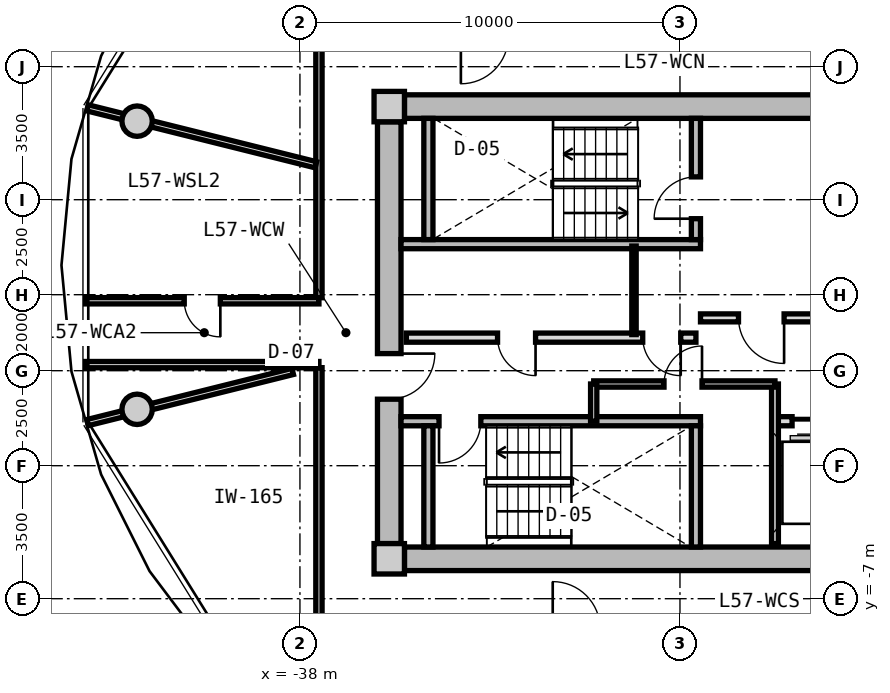
"""IFC4 building model, lengths in metres.
Left out: names, types, materials, properties, quantities, classifications, styles, units other than length and angle.
Written with IfcOpenShell. Run it as: python <this file> out.ifc"""

import sys

from ifc_helpers import new_model, si_unit, direction, frame, frame_2d, origin, origin_2d, place, context, subcontext, project, spatial, rectangle, circle, extrude, source, transform, mapped, element, fill, save


model = new_model("IFC4")
c1 = context("Model", 3, precision=1e-05, world=origin(), true_north=direction((0.0, 1.0)))
c2 = subcontext(c1, "Body", "Model", "MODEL_VIEW")
j1 = project(units=[si_unit("LENGTHUNIT", "METRE"), si_unit("PLANEANGLEUNIT", "RADIAN")], contexts=[c1])
p1 = place(None, origin())
s1 = spatial("IfcSite", under=j1, at=p1, CompositionType="ELEMENT")
p2 = place(p1, origin())
s2 = spatial("IfcBuilding", under=s1, at=p2, CompositionType="ELEMENT")
p3 = place(p2, frame((0.0, 0.0, 183.1)))
s3 = spatial("IfcBuildingStorey", under=s2, at=p3, CompositionType="ELEMENT", Elevation=183.1)
m1 = source(origin(), c2, "Body", "SweptSolid", [
    extrude(rectangle(XDim=0.8, YDim=0.8, at=origin_2d()), origin(), (0.0, 0.0, 1.0), 3.05),
])
for number, where, z_axis, x_axis in (
    (1, (-35.65, -5.95, 0.0), (0.0, 0.0, 1.0), (1.0, 0.0, 0.0)),
    (2, (-35.65, 5.95, 0.0), (0.0, 0.0, 1.0), (1.0, 0.0, 0.0)),
):
    element("IfcColumn", number, at=place(p3, frame(where, z_axis=z_axis, x_axis=x_axis)), inside=s3, PredefinedType="COLUMN", context=c2, shape_type="MappedRepresentation", body=[
        mapped(m1, transform((0.0, 0.0, 0.0), x_axis=(1.0, 0.0, 0.0), y_axis=(0.0, 1.0, 0.0), z_axis=(0.0, 0.0, 1.0), scale=1.0)),
    ])
m2 = source(origin(), c2, "Body", "SweptSolid", [
    extrude(rectangle(XDim=14.5, YDim=0.62, at=frame_2d((7.25, 0.0))), origin(), (0.0, 0.0, 1.0), 2.73),
])
for number, where, z_axis, x_axis in (
    (3, (-35.25, 5.95, 0.0), (0.0, 0.0, 1.0), (1.0, 0.0, 0.0)),
    (4, (-20.75, -5.95, 0.0), (0.0, 0.0, 1.0), (-1.0, 0.0, 0.0)),
):
    element("IfcWall", number, at=place(p3, frame(where, z_axis=z_axis, x_axis=x_axis)), inside=s3, PredefinedType="SHEAR", context=c2, shape_type="MappedRepresentation", body=[
        mapped(m2, transform((0.0, 0.0, 0.0), x_axis=(1.0, 0.0, 0.0), y_axis=(0.0, 1.0, 0.0), z_axis=(0.0, 0.0, 1.0), scale=1.0)),
    ])
m3 = source(origin(), c2, "Body", "SweptSolid", [
    extrude(rectangle(XDim=11.1, YDim=0.62, at=frame_2d((5.55, 0.0))), origin(), (0.0, 0.0, 1.0), 2.73),
])
p4 = place(p3, frame((-35.65, -5.55, 0.0), z_axis=(0.0, 0.0, 1.0), x_axis=(0.0, 1.0, 0.0)))
e5 = element("IfcWall", 5, at=p4, inside=s3, PredefinedType="SHEAR", context=c2, shape_type="MappedRepresentation", body=[
    mapped(m3, transform((0.0, 0.0, 0.0), x_axis=(1.0, 0.0, 0.0), y_axis=(0.0, 1.0, 0.0), z_axis=(0.0, 0.0, 1.0), scale=1.0)),
])
p5 = place(p4, frame((3.8, 0.0, 0.0)))
e6 = element("IfcOpeningElement", 6, at=p5, cuts=e5, PredefinedType="OPENING", context=c2, shape_type="SweptSolid", body=[
    extrude(rectangle(XDim=1.2, YDim=2.15, at=frame_2d((0.6, 1.075))), frame((0.0, 0.32, 0.0), z_axis=(0.0, -1.0, 0.0), x_axis=(1.0, 0.0, 0.0)), (0.0, 0.0, 1.0), 0.64),
])
m4 = source(origin(), c2, "Body", "SweptSolid", [
    extrude(circle(Radius=0.4, at=origin_2d()), origin(), (0.0, 0.0, 1.0), 3.05),
])
for number, where, z_axis, x_axis in (
    (7, (-42.285, 5.567, 0.0), (0.0, 0.0, 1.0), (1.0, 0.0, 0.0)),
    (8, (-42.285, -2.016, 0.0), (0.0, 0.0, 1.0), (1.0, 0.0, 0.0)),
):
    element("IfcColumn", number, at=place(p3, frame(where, z_axis=z_axis, x_axis=x_axis)), inside=s3, PredefinedType="COLUMN", context=c2, shape_type="MappedRepresentation", body=[
        mapped(m4, transform((0.0, 0.0, 0.0), x_axis=(1.0, 0.0, 0.0), y_axis=(0.0, 1.0, 0.0), z_axis=(0.0, 0.0, 1.0), scale=1.0)),
    ])
m5 = source(origin(), c2, "Body", "SweptSolid", [
    extrude(rectangle(XDim=7.88, YDim=0.24, at=frame_2d((3.94, 0.0))), origin(), (0.0, 0.0, 1.0), 2.73),
])
p6 = place(p3, frame((-35.34, 2.33, 0.0), z_axis=(0.0, 0.0, 1.0), x_axis=(1.0, 0.0, 0.0)))
e9 = element("IfcWall", 9, at=p6, inside=s3, PredefinedType="PARTITIONING", context=c2, shape_type="MappedRepresentation", body=[
    mapped(m5, transform((0.0, 0.0, 0.0), x_axis=(1.0, 0.0, 0.0), y_axis=(0.0, 1.0, 0.0), z_axis=(0.0, 0.0, 1.0), scale=1.0)),
])
m6 = source(origin(), c2, "Body", "SweptSolid", [
    extrude(rectangle(XDim=3.19, YDim=0.24, at=frame_2d((1.595, 0.0))), origin(), (0.0, 0.0, 1.0), 2.73),
])
p7 = place(p3, frame((-34.62, 2.45, 0.0), z_axis=(0.0, 0.0, 1.0), x_axis=(0.0, 1.0, 0.0)))
e10 = element("IfcWall", 10, at=p7, inside=s3, PredefinedType="PARTITIONING", context=c2, shape_type="MappedRepresentation", body=[
    mapped(m6, transform((0.0, 0.0, 0.0), x_axis=(1.0, 0.0, 0.0), y_axis=(0.0, 1.0, 0.0), z_axis=(0.0, 0.0, 1.0), scale=1.0)),
])
p8 = place(p3, frame((-27.58, 2.45, 0.0), z_axis=(0.0, 0.0, 1.0), x_axis=(0.0, 1.0, 0.0)))
e11 = element("IfcWall", 11, at=p8, inside=s3, PredefinedType="PARTITIONING", context=c2, shape_type="MappedRepresentation", body=[
    mapped(m6, transform((0.0, 0.0, 0.0), x_axis=(1.0, 0.0, 0.0), y_axis=(0.0, 1.0, 0.0), z_axis=(0.0, 0.0, 1.0), scale=1.0)),
])
p9 = place(p8, frame((0.55, 0.0, 0.0)))
e12 = element("IfcOpeningElement", 12, at=p9, cuts=e11, PredefinedType="OPENING", context=c2, shape_type="SweptSolid", body=[
    extrude(rectangle(XDim=1.1, YDim=2.15, at=frame_2d((0.55, 1.075))), frame((0.0, 0.13, 0.0), z_axis=(0.0, -1.0, 0.0), x_axis=(1.0, 0.0, 0.0)), (0.0, 0.0, 1.0), 0.26),
])
p10 = place(p3, frame((-35.34, -2.33, 0.0), z_axis=(0.0, 0.0, 1.0), x_axis=(1.0, 0.0, 0.0)))
e13 = element("IfcWall", 13, at=p10, inside=s3, PredefinedType="PARTITIONING", context=c2, shape_type="MappedRepresentation", body=[
    mapped(m5, transform((0.0, 0.0, 0.0), x_axis=(1.0, 0.0, 0.0), y_axis=(0.0, 1.0, 0.0), z_axis=(0.0, 0.0, 1.0), scale=1.0)),
])
p11 = place(p10, frame((1.0, 0.0, 0.0)))
e14 = element("IfcOpeningElement", 14, at=p11, cuts=e13, PredefinedType="OPENING", context=c2, shape_type="SweptSolid", body=[
    extrude(rectangle(XDim=1.1, YDim=2.15, at=frame_2d((0.55, 1.075))), frame((0.0, 0.13, 0.0), z_axis=(0.0, -1.0, 0.0), x_axis=(1.0, 0.0, 0.0)), (0.0, 0.0, 1.0), 0.26),
])
for number, where, z_axis, x_axis in (
    (15, (-34.62, -5.64, 0.0), (0.0, 0.0, 1.0), (0.0, 1.0, 0.0)),
    (16, (-27.58, -5.64, 0.0), (0.0, 0.0, 1.0), (0.0, 1.0, 0.0)),
):
    element("IfcWall", number, at=place(p3, frame(where, z_axis=z_axis, x_axis=x_axis)), inside=s3, PredefinedType="PARTITIONING", context=c2, shape_type="MappedRepresentation", body=[
        mapped(m6, transform((0.0, 0.0, 0.0), x_axis=(1.0, 0.0, 0.0), y_axis=(0.0, 1.0, 0.0), z_axis=(0.0, 0.0, 1.0), scale=1.0)),
    ])
m7 = source(origin(), c2, "Body", "SweptSolid", [
    extrude(rectangle(XDim=6.66, YDim=0.21, at=frame_2d((3.33, 0.0))), origin(), (0.0, 0.0, 1.0), 2.715),
])
p12 = place(p3, frame((-27.46, 0.39, 0.0), z_axis=(0.0, 0.0, 1.0), x_axis=(1.0, 0.0, 0.0)))
e17 = element("IfcWall", 17, at=p12, inside=s3, PredefinedType="PARTITIONING", context=c2, shape_type="MappedRepresentation", body=[
    mapped(m7, transform((0.0, 0.0, 0.0), x_axis=(1.0, 0.0, 0.0), y_axis=(0.0, 1.0, 0.0), z_axis=(0.0, 0.0, 1.0), scale=1.0)),
])
p13 = place(p12, frame((1.0, 0.0, 0.0)))
e18 = element("IfcOpeningElement", 18, at=p13, cuts=e17, PredefinedType="OPENING", context=c2, shape_type="SweptSolid", body=[
    extrude(rectangle(XDim=1.2, YDim=2.15, at=frame_2d((0.6, 1.075))), frame((0.0, 0.115, 0.0), z_axis=(0.0, -1.0, 0.0), x_axis=(1.0, 0.0, 0.0)), (0.0, 0.0, 1.0), 0.23),
])
m8 = source(origin(), c2, "Body", "SweptSolid", [
    extrude(rectangle(XDim=7.62, YDim=0.24, at=frame_2d((3.81, 0.0))), origin(), (0.0, 0.0, 1.0), 2.715),
])
p14 = place(p3, frame((-35.2, -0.13, 0.0), z_axis=(0.0, 0.0, 1.0), x_axis=(1.0, 0.0, 0.0)))
e19 = element("IfcWall", 19, at=p14, inside=s3, PredefinedType="PARTITIONING", context=c2, shape_type="MappedRepresentation", body=[
    mapped(m8, transform((0.0, 0.0, 0.0), x_axis=(1.0, 0.0, 0.0), y_axis=(0.0, 1.0, 0.0), z_axis=(0.0, 0.0, 1.0), scale=1.0)),
])
p15 = place(p14, frame((6.22, 0.0, 0.0)))
e20 = element("IfcOpeningElement", 20, at=p15, cuts=e19, PredefinedType="OPENING", context=c2, shape_type="SweptSolid", body=[
    extrude(rectangle(XDim=1.0, YDim=2.1, at=frame_2d((0.5, 1.05))), frame((0.0, 0.13, 0.0), z_axis=(0.0, -1.0, 0.0), x_axis=(1.0, 0.0, 0.0)), (0.0, 0.0, 1.0), 0.26),
])
p16 = place(p14, frame((2.4, 0.0, 0.0)))
e21 = element("IfcOpeningElement", 21, at=p16, cuts=e19, PredefinedType="OPENING", context=c2, shape_type="SweptSolid", body=[
    extrude(rectangle(XDim=1.0, YDim=2.1, at=frame_2d((0.5, 1.05))), frame((0.0, 0.13, 0.0), z_axis=(0.0, -1.0, 0.0), x_axis=(1.0, 0.0, 0.0)), (0.0, 0.0, 1.0), 0.26),
])
m9 = source(origin(), c2, "Body", "SweptSolid", [
    extrude(rectangle(XDim=2.33, YDim=0.115, at=frame_2d((1.165, 0.0))), origin(), (0.0, 0.0, 1.0), 2.715),
])
p17 = place(p3, frame((-29.21, -0.05, 0.0), z_axis=(0.0, 0.0, 1.0), x_axis=(0.0, 1.0, 0.0)))
e22 = element("IfcWall", 22, at=p17, inside=s3, PredefinedType="PARTITIONING", context=c2, shape_type="MappedRepresentation", body=[
    mapped(m9, transform((0.0, 0.0, 0.0), x_axis=(1.0, 0.0, 0.0), y_axis=(0.0, 1.0, 0.0), z_axis=(0.0, 0.0, 1.0), scale=1.0)),
])
m10 = source(origin(), c2, "Body", "SweptSolid", [
    extrude(rectangle(XDim=2.05, YDim=0.24, at=frame_2d((1.025, 0.0))), origin(), (0.0, 0.0, 1.0), 2.715),
])
p18 = place(p3, frame((-25.5, -2.33, 0.0), z_axis=(0.0, 0.0, 1.0), x_axis=(1.0, 0.0, 0.0)))
e23 = element("IfcWall", 23, at=p18, inside=s3, PredefinedType="PARTITIONING", context=c2, shape_type="MappedRepresentation", body=[
    mapped(m10, transform((0.0, 0.0, 0.0), x_axis=(1.0, 0.0, 0.0), y_axis=(0.0, 1.0, 0.0), z_axis=(0.0, 0.0, 1.0), scale=1.0)),
])
p19 = place(p18, frame((0.45, 0.0, 0.0)))
e24 = element("IfcOpeningElement", 24, at=p19, cuts=e23, PredefinedType="OPENING", context=c2, shape_type="SweptSolid", body=[
    extrude(rectangle(XDim=1.1, YDim=2.2, at=frame_2d((0.55, 1.1))), frame((0.0, 0.13, 0.0), z_axis=(0.0, -1.0, 0.0), x_axis=(1.0, 0.0, 0.0)), (0.0, 0.0, 1.0), 0.26),
])
m11 = source(origin(), c2, "Body", "SweptSolid", [
    extrude(rectangle(XDim=4.2, YDim=0.18, at=frame_2d((2.1, 0.0))), origin(), (0.0, 0.0, 1.0), 2.715),
])
p20 = place(p3, frame((-25.5, -5.55, 0.0), z_axis=(0.0, 0.0, 1.0), x_axis=(0.0, 1.0, 0.0)))
e25 = element("IfcWall", 25, at=p20, inside=s3, PredefinedType="PARTITIONING", context=c2, shape_type="MappedRepresentation", body=[
    mapped(m11, transform((0.0, 0.0, 0.0), x_axis=(1.0, 0.0, 0.0), y_axis=(0.0, 1.0, 0.0), z_axis=(0.0, 0.0, 1.0), scale=1.0)),
])
m12 = source(origin(), c2, "Body", "SweptSolid", [
    extrude(rectangle(XDim=4.77, YDim=0.165, at=frame_2d((2.385, 0.0))), origin(), (0.0, 0.0, 1.0), 2.715),
])
p21 = place(p3, frame((-30.27, -1.35, 0.0), z_axis=(0.0, 0.0, 1.0), x_axis=(1.0, 0.0, 0.0)))
e26 = element("IfcWall", 26, at=p21, inside=s3, PredefinedType="PARTITIONING", context=c2, shape_type="MappedRepresentation", body=[
    mapped(m12, transform((0.0, 0.0, 0.0), x_axis=(1.0, 0.0, 0.0), y_axis=(0.0, 1.0, 0.0), z_axis=(0.0, 0.0, 1.0), scale=1.0)),
])
p22 = place(p21, frame((1.85, 0.0, 0.0)))
e27 = element("IfcOpeningElement", 27, at=p22, cuts=e26, PredefinedType="OPENING", context=c2, shape_type="SweptSolid", body=[
    extrude(rectangle(XDim=1.0, YDim=2.1, at=frame_2d((0.5, 1.05))), frame((0.0, 0.093, 0.0), z_axis=(0.0, -1.0, 0.0), x_axis=(1.0, 0.0, 0.0)), (0.0, 0.0, 1.0), 0.185),
])
m13 = source(origin(), c2, "Body", "SweptSolid", [
    extrude(rectangle(XDim=0.98, YDim=0.165, at=frame_2d((0.49, 0.0))), origin(), (0.0, 0.0, 1.0), 2.715),
])
p23 = place(p3, frame((-30.27, -2.33, 0.0), z_axis=(0.0, 0.0, 1.0), x_axis=(0.0, 1.0, 0.0)))
e28 = element("IfcWall", 28, at=p23, inside=s3, PredefinedType="PARTITIONING", context=c2, shape_type="MappedRepresentation", body=[
    mapped(m13, transform((0.0, 0.0, 0.0), x_axis=(1.0, 0.0, 0.0), y_axis=(0.0, 1.0, 0.0), z_axis=(0.0, 0.0, 1.0), scale=1.0)),
])
m14 = source(origin(), c2, "Body", "SweptSolid", [
    extrude(rectangle(XDim=6.88, YDim=0.165, at=frame_2d((3.44, 0.0))), origin(), (0.0, 0.0, 1.0), 2.715),
])
for number, where, z_axis, x_axis in (
    (29, (-37.5, -7.8, 0.0), (0.0, 0.0, 1.0), (0.0, 1.0, 0.0)),
    (30, (-37.5, 0.92, 0.0), (0.0, 0.0, 1.0), (0.0, 1.0, 0.0)),
):
    element("IfcWall", number, at=place(p3, frame(where, z_axis=z_axis, x_axis=x_axis)), inside=s3, PredefinedType="PARTITIONING", context=c2, shape_type="MappedRepresentation", body=[
        mapped(m14, transform((0.0, 0.0, 0.0), x_axis=(1.0, 0.0, 0.0), y_axis=(0.0, 1.0, 0.0), z_axis=(0.0, 0.0, 1.0), scale=1.0)),
    ])
m15 = source(origin(), c2, "Body", "SweptSolid", [
    extrude(rectangle(XDim=6.193, YDim=0.165, at=frame_2d((3.096, 0.0))), origin(), (0.0, 0.0, 1.0), 2.265),
])
p24 = place(p3, frame((-37.58, 4.419, 0.0), z_axis=(0.0, 0.0, 1.0), x_axis=(-0.970309243466, 0.241867674657, 0.0)))
e31 = element("IfcWall", 31, at=p24, inside=s3, PredefinedType="PARTITIONING", context=c2, shape_type="MappedRepresentation", body=[
    mapped(m15, transform((0.0, 0.0, 0.0), x_axis=(1.0, 0.0, 0.0), y_axis=(0.0, 1.0, 0.0), z_axis=(0.0, 0.0, 1.0), scale=1.0)),
])
m16 = source(origin(), c2, "Body", "SweptSolid", [
    extrude(rectangle(XDim=5.564, YDim=0.165, at=frame_2d((2.782, 0.0))), origin(), (0.0, 0.0, 1.0), 2.265),
])
p25 = place(p3, frame((-38.19, -1.02, 0.0), z_axis=(0.0, 0.0, 1.0), x_axis=(-0.97031260977, -0.241854169533, 0.0)))
e32 = element("IfcWall", 32, at=p25, inside=s3, PredefinedType="PARTITIONING", context=c2, shape_type="MappedRepresentation", body=[
    mapped(m16, transform((0.0, 0.0, 0.0), x_axis=(1.0, 0.0, 0.0), y_axis=(0.0, 1.0, 0.0), z_axis=(0.0, 0.0, 1.0), scale=1.0)),
])
m17 = source(origin(), c2, "Body", "SweptSolid", [
    extrude(rectangle(XDim=6.139, YDim=0.165, at=frame_2d((3.069, 0.0))), origin(), (0.0, 0.0, 1.0), 2.715),
])
p26 = place(p3, frame((-43.639, 0.84, 0.0), z_axis=(0.0, 0.0, 1.0), x_axis=(1.0, 0.0, 0.0)))
e33 = element("IfcWall", 33, at=p26, inside=s3, PredefinedType="PARTITIONING", context=c2, shape_type="MappedRepresentation", body=[
    mapped(m17, transform((0.0, 0.0, 0.0), x_axis=(1.0, 0.0, 0.0), y_axis=(0.0, 1.0, 0.0), z_axis=(0.0, 0.0, 1.0), scale=1.0)),
])
p27 = place(p26, frame((2.594, 0.0, 0.0)))
e34 = element("IfcOpeningElement", 34, at=p27, cuts=e33, PredefinedType="OPENING", context=c2, shape_type="SweptSolid", body=[
    extrude(rectangle(XDim=0.95, YDim=2.1, at=frame_2d((0.475, 1.05))), frame((0.0, 0.093, 0.0), z_axis=(0.0, -1.0, 0.0), x_axis=(1.0, 0.0, 0.0)), (0.0, 0.0, 1.0), 0.185),
])
p28 = place(p3, frame((-37.5, -0.84, 0.0), z_axis=(0.0, 0.0, 1.0), x_axis=(-1.0, 0.0, 0.0)))
e35 = element("IfcWall", 35, at=p28, inside=s3, PredefinedType="PARTITIONING", context=c2, shape_type="MappedRepresentation", body=[
    mapped(m17, transform((0.0, 0.0, 0.0), x_axis=(1.0, 0.0, 0.0), y_axis=(0.0, 1.0, 0.0), z_axis=(0.0, 0.0, 1.0), scale=1.0)),
])
m18 = source(origin(), c2, "Body", "SweptSolid", [
    extrude(rectangle(XDim=1.1, YDim=2.15, at=frame_2d((0.55, 1.075))), frame((0.0, 0.025, 0.0), z_axis=(0.0, -1.0, 0.0), x_axis=(1.0, 0.0, 0.0)), (0.0, 0.0, 1.0), 0.05),
])
p29 = place(p9, origin())
e36 = element("IfcDoor", 36, at=p29, inside=s3, OperationType="SINGLE_SWING_LEFT", PredefinedType="DOOR", context=c2, shape_type="MappedRepresentation", body=[
    mapped(m18, transform((0.0, 0.0, 0.0), x_axis=(1.0, 0.0, 0.0), y_axis=(0.0, 1.0, 0.0), z_axis=(0.0, 0.0, 1.0), scale=1.0)),
])
fill(e12, e36)
p30 = place(p11, frame((1.1, 0.0, 0.0), z_axis=(0.0, 0.0, 1.0), x_axis=(-1.0, 0.0, 0.0)))
e37 = element("IfcDoor", 37, at=p30, inside=s3, OperationType="SINGLE_SWING_RIGHT", PredefinedType="DOOR", context=c2, shape_type="MappedRepresentation", body=[
    mapped(m18, transform((0.0, 0.0, 0.0), x_axis=(1.0, 0.0, 0.0), y_axis=(0.0, 1.0, 0.0), z_axis=(0.0, 0.0, 1.0), scale=1.0)),
])
fill(e14, e37)
m19 = source(origin(), c2, "Body", "SweptSolid", [
    extrude(rectangle(XDim=1.2, YDim=2.15, at=frame_2d((0.6, 1.075))), frame((0.0, 0.025, 0.0), z_axis=(0.0, -1.0, 0.0), x_axis=(1.0, 0.0, 0.0)), (0.0, 0.0, 1.0), 0.05),
])
p31 = place(p13, frame((1.2, 0.0, 0.0), z_axis=(0.0, 0.0, 1.0), x_axis=(-1.0, 0.0, 0.0)))
e38 = element("IfcDoor", 38, at=p31, inside=s3, OperationType="SINGLE_SWING_LEFT", PredefinedType="DOOR", context=c2, shape_type="MappedRepresentation", body=[
    mapped(m19, transform((0.0, 0.0, 0.0), x_axis=(1.0, 0.0, 0.0), y_axis=(0.0, 1.0, 0.0), z_axis=(0.0, 0.0, 1.0), scale=1.0)),
])
fill(e18, e38)
p32 = place(p5, frame((1.2, 0.0, 0.0), z_axis=(0.0, 0.0, 1.0), x_axis=(-1.0, 0.0, 0.0)))
e39 = element("IfcDoor", 39, at=p32, inside=s3, OperationType="SINGLE_SWING_LEFT", PredefinedType="DOOR", context=c2, shape_type="MappedRepresentation", body=[
    mapped(m19, transform((0.0, 0.0, 0.0), x_axis=(1.0, 0.0, 0.0), y_axis=(0.0, 1.0, 0.0), z_axis=(0.0, 0.0, 1.0), scale=1.0)),
])
fill(e6, e39)
m20 = source(origin(), c2, "Body", "SweptSolid", [
    extrude(rectangle(XDim=1.0, YDim=2.1, at=frame_2d((0.5, 1.05))), frame((0.0, 0.025, 0.0), z_axis=(0.0, -1.0, 0.0), x_axis=(1.0, 0.0, 0.0)), (0.0, 0.0, 1.0), 0.05),
])
p33 = place(p15, frame((1.0, 0.0, 0.0), z_axis=(0.0, 0.0, 1.0), x_axis=(-1.0, 0.0, 0.0)))
e40 = element("IfcDoor", 40, at=p33, inside=s3, OperationType="SINGLE_SWING_LEFT", PredefinedType="DOOR", context=c2, shape_type="MappedRepresentation", body=[
    mapped(m20, transform((0.0, 0.0, 0.0), x_axis=(1.0, 0.0, 0.0), y_axis=(0.0, 1.0, 0.0), z_axis=(0.0, 0.0, 1.0), scale=1.0)),
])
fill(e20, e40)
p34 = place(p16, frame((1.0, 0.0, 0.0), z_axis=(0.0, 0.0, 1.0), x_axis=(-1.0, 0.0, 0.0)))
e41 = element("IfcDoor", 41, at=p34, inside=s3, OperationType="SINGLE_SWING_LEFT", PredefinedType="DOOR", context=c2, shape_type="MappedRepresentation", body=[
    mapped(m20, transform((0.0, 0.0, 0.0), x_axis=(1.0, 0.0, 0.0), y_axis=(0.0, 1.0, 0.0), z_axis=(0.0, 0.0, 1.0), scale=1.0)),
])
fill(e21, e41)
m21 = source(origin(), c2, "Body", "SweptSolid", [
    extrude(rectangle(XDim=1.1, YDim=2.2, at=frame_2d((0.55, 1.1))), frame((0.0, 0.025, 0.0), z_axis=(0.0, -1.0, 0.0), x_axis=(1.0, 0.0, 0.0)), (0.0, 0.0, 1.0), 0.05),
])
p35 = place(p19, frame((1.1, 0.0, 0.0), z_axis=(0.0, 0.0, 1.0), x_axis=(-1.0, 0.0, 0.0)))
e42 = element("IfcDoor", 42, at=p35, inside=s3, OperationType="SLIDING_TO_RIGHT", PredefinedType="DOOR", context=c2, shape_type="MappedRepresentation", body=[
    mapped(m21, transform((0.0, 0.0, 0.0), x_axis=(1.0, 0.0, 0.0), y_axis=(0.0, 1.0, 0.0), z_axis=(0.0, 0.0, 1.0), scale=1.0)),
])
fill(e24, e42)
p36 = place(p22, origin())
e43 = element("IfcDoor", 43, at=p36, inside=s3, OperationType="SINGLE_SWING_RIGHT", PredefinedType="DOOR", context=c2, shape_type="MappedRepresentation", body=[
    mapped(m20, transform((0.0, 0.0, 0.0), x_axis=(1.0, 0.0, 0.0), y_axis=(0.0, 1.0, 0.0), z_axis=(0.0, 0.0, 1.0), scale=1.0)),
])
fill(e27, e43)
m22 = source(origin(), c2, "Body", "SweptSolid", [
    extrude(rectangle(XDim=0.95, YDim=2.1, at=frame_2d((0.475, 1.05))), frame((0.0, 0.025, 0.0), z_axis=(0.0, -1.0, 0.0), x_axis=(1.0, 0.0, 0.0)), (0.0, 0.0, 1.0), 0.05),
])
p37 = place(p27, frame((0.95, 0.0, 0.0), z_axis=(0.0, 0.0, 1.0), x_axis=(-1.0, 0.0, 0.0)))
e44 = element("IfcDoor", 44, at=p37, inside=s3, OperationType="SINGLE_SWING_LEFT", PredefinedType="DOOR", context=c2, shape_type="MappedRepresentation", body=[
    mapped(m22, transform((0.0, 0.0, 0.0), x_axis=(1.0, 0.0, 0.0), y_axis=(0.0, 1.0, 0.0), z_axis=(0.0, 0.0, 1.0), scale=1.0)),
])
fill(e34, e44)
save(model, sys.argv[1])
